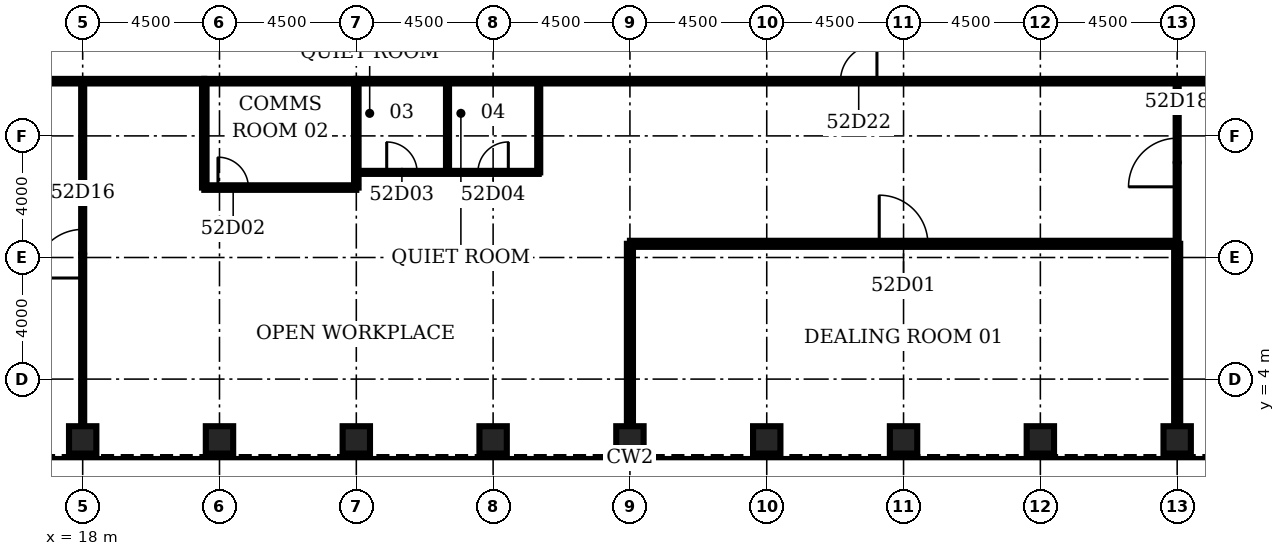
"""IFC4 building model, lengths in metres.
Left out: names, types, materials, properties, quantities, classifications, styles, units other than length and angle.
Written with IfcOpenShell. Run it as: python <this file> out.ifc"""

import sys

from ifc_helpers import new_model, si_unit, direction, frame, frame_2d, origin, origin_2d, place, context, subcontext, project, spatial, rectangle, hollow_rectangle, extrude, element, fill, save


model = new_model("IFC4")
c1 = context("Model", 3, precision=1e-05, world=origin(), true_north=direction((0.0, 1.0)))
c2 = subcontext(c1, "Body", "Model", "MODEL_VIEW")
j1 = project(units=[si_unit("LENGTHUNIT", "METRE"), si_unit("PLANEANGLEUNIT", "RADIAN")], contexts=[c1])
p1 = place(None, origin())
s1 = spatial("IfcSite", under=j1, at=p1, CompositionType="ELEMENT")
p2 = place(p1, origin())
s2 = spatial("IfcBuilding", under=s1, at=p2, CompositionType="ELEMENT")
p3 = place(p2, frame((0.0, 0.0, 232.0)))
s3 = spatial("IfcBuildingStorey", under=s2, at=p3, CompositionType="ELEMENT", Elevation=232.0)
for number, where, z_axis, x_axis in (
    (1, (18.0, 2.0, 0.0), (0.0, 0.0, 1.0), (0.0, 1.0, 0.0)),
    (2, (22.5, 2.0, 0.0), (0.0, 0.0, 1.0), (0.0, 1.0, 0.0)),
    (3, (27.0, 2.0, 0.0), (0.0, 0.0, 1.0), (0.0, 1.0, 0.0)),
    (4, (31.5, 2.0, 0.0), (0.0, 0.0, 1.0), (0.0, 1.0, 0.0)),
    (5, (36.0, 2.0, 0.0), (0.0, 0.0, 1.0), (0.0, 1.0, 0.0)),
    (6, (40.5, 2.0, 0.0), (0.0, 0.0, 1.0), (0.0, 1.0, 0.0)),
    (7, (45.0, 2.0, 0.0), (0.0, 0.0, 1.0), (0.0, 1.0, 0.0)),
    (8, (49.5, 2.0, 0.0), (0.0, 0.0, 1.0), (0.0, 1.0, 0.0)),
    (9, (54.0, 2.0, 0.0), (0.0, 0.0, 1.0), (0.0, 1.0, 0.0)),
):
    element("IfcColumn", number, at=place(p3, frame(where, z_axis=z_axis, x_axis=x_axis)), inside=s3, PredefinedType="COLUMN", context=c2, shape_type="SweptSolid", body=[
        extrude(hollow_rectangle(XDim=0.9, YDim=0.9, WallThickness=0.08, at=origin_2d()), origin(), (0.0, 0.0, 1.0), 4.2),
    ])
p4 = place(p3, frame((36.0, 8.45, 0.0), z_axis=(0.0, 0.0, 1.0), x_axis=(1.0, 0.0, 0.0)))
e10 = element("IfcWall", 10, at=p4, inside=s3, PredefinedType="PARTITIONING", context=c2, shape_type="SweptSolid", body=[
    extrude(rectangle(XDim=18.0, YDim=0.2, at=frame_2d((9.0, 0.0))), origin(), (0.0, 0.0, 1.0), 3.0),
])
p5 = place(p4, frame((8.2, 0.0, 0.0)))
e11 = element("IfcOpeningElement", 11, at=p5, cuts=e10, PredefinedType="OPENING", context=c2, shape_type="SweptSolid", body=[
    extrude(rectangle(XDim=1.6, YDim=2.1, at=frame_2d((0.8, 1.05))), frame((0.0, 0.11, 0.0), z_axis=(0.0, -1.0, 0.0), x_axis=(1.0, 0.0, 0.0)), (0.0, 0.0, 1.0), 0.22),
])
p6 = place(p3, frame((22.0, 10.3, 0.0), z_axis=(0.0, 0.0, 1.0), x_axis=(1.0, 0.0, 0.0)))
e12 = element("IfcWall", 12, at=p6, inside=s3, PredefinedType="PARTITIONING", context=c2, shape_type="SweptSolid", body=[
    extrude(rectangle(XDim=5.0, YDim=0.15, at=frame_2d((2.5, 0.0))), origin(), (0.0, 0.0, 1.0), 3.0),
])
p7 = place(p6, frame((0.45, 0.0, 0.0)))
e13 = element("IfcOpeningElement", 13, at=p7, cuts=e12, PredefinedType="OPENING", context=c2, shape_type="SweptSolid", body=[
    extrude(rectangle(XDim=1.0, YDim=2.1, at=frame_2d((0.5, 1.05))), frame((0.0, 0.085, 0.0), z_axis=(0.0, -1.0, 0.0), x_axis=(1.0, 0.0, 0.0)), (0.0, 0.0, 1.0), 0.17),
])
p8 = place(p3, frame((27.0, 10.8, 0.0), z_axis=(0.0, 0.0, 1.0), x_axis=(1.0, 0.0, 0.0)))
e14 = element("IfcWall", 14, at=p8, inside=s3, PredefinedType="PARTITIONING", context=c2, shape_type="SweptSolid", body=[
    extrude(rectangle(XDim=6.0, YDim=0.1, at=frame_2d((3.0, 0.0))), origin(), (0.0, 0.0, 1.0), 3.0),
])
p9 = place(p8, frame((1.0, 0.0, 0.0)))
e15 = element("IfcOpeningElement", 15, at=p9, cuts=e14, PredefinedType="OPENING", context=c2, shape_type="SweptSolid", body=[
    extrude(rectangle(XDim=1.0, YDim=2.1, at=frame_2d((0.5, 1.05))), frame((0.0, 0.06, 0.0), z_axis=(0.0, -1.0, 0.0), x_axis=(1.0, 0.0, 0.0)), (0.0, 0.0, 1.0), 0.12),
])
p10 = place(p8, frame((4.0, 0.0, 0.0)))
e16 = element("IfcOpeningElement", 16, at=p10, cuts=e14, PredefinedType="OPENING", context=c2, shape_type="SweptSolid", body=[
    extrude(rectangle(XDim=1.0, YDim=2.1, at=frame_2d((0.5, 1.05))), frame((0.0, 0.06, 0.0), z_axis=(0.0, -1.0, 0.0), x_axis=(1.0, 0.0, 0.0)), (0.0, 0.0, 1.0), 0.12),
])
p11 = place(p3, frame((15.2, 13.8, 0.0), z_axis=(0.0, 0.0, 1.0), x_axis=(1.0, 0.0, 0.0)))
e17 = element("IfcWall", 17, at=p11, inside=s3, PredefinedType="PARTITIONING", context=c2, shape_type="SweptSolid", body=[
    extrude(rectangle(XDim=6.8, YDim=0.15, at=frame_2d((3.4, 0.0))), origin(), (0.0, 0.0, 1.0), 3.0),
])
p12 = place(p3, frame((22.0, 13.8, 0.0), z_axis=(0.0, 0.0, 1.0), x_axis=(1.0, 0.0, 0.0)))
e18 = element("IfcWall", 18, at=p12, inside=s3, PredefinedType="PARTITIONING", context=c2, shape_type="SweptSolid", body=[
    extrude(rectangle(XDim=5.0, YDim=0.15, at=frame_2d((2.5, 0.0))), origin(), (0.0, 0.0, 1.0), 3.0),
])
p13 = place(p3, frame((27.0, 13.8, 0.0), z_axis=(0.0, 0.0, 1.0), x_axis=(1.0, 0.0, 0.0)))
e19 = element("IfcWall", 19, at=p13, inside=s3, PredefinedType="PARTITIONING", context=c2, shape_type="SweptSolid", body=[
    extrude(rectangle(XDim=29.8, YDim=0.15, at=frame_2d((14.9, 0.0))), origin(), (0.0, 0.0, 1.0), 3.0),
])
p14 = place(p13, frame((15.925, 0.0, 0.0)))
e20 = element("IfcOpeningElement", 20, at=p14, cuts=e19, PredefinedType="OPENING", context=c2, shape_type="SweptSolid", body=[
    extrude(rectangle(XDim=1.2, YDim=2.1, at=frame_2d((0.6, 1.05))), frame((0.0, 0.085, 0.0), z_axis=(0.0, -1.0, 0.0), x_axis=(1.0, 0.0, 0.0)), (0.0, 0.0, 1.0), 0.17),
])
p15 = place(p3, frame((18.0, 2.45, 0.0), z_axis=(0.0, 0.0, 1.0), x_axis=(0.0, 1.0, 0.0)))
e21 = element("IfcWall", 21, at=p15, inside=s3, PredefinedType="PARTITIONING", context=c2, shape_type="SweptSolid", body=[
    extrude(rectangle(XDim=11.35, YDim=0.1, at=frame_2d((5.675, 0.0))), origin(), (0.0, 0.0, 1.0), 3.0),
])
p16 = place(p15, frame((4.875, 0.0, 0.0)))
e22 = element("IfcOpeningElement", 22, at=p16, cuts=e21, PredefinedType="OPENING", context=c2, shape_type="SweptSolid", body=[
    extrude(rectangle(XDim=1.6, YDim=2.1, at=frame_2d((0.8, 1.05))), frame((0.0, 0.06, 0.0), z_axis=(0.0, -1.0, 0.0), x_axis=(1.0, 0.0, 0.0)), (0.0, 0.0, 1.0), 0.12),
])
for number, where, z_axis, x_axis in (
    (23, (22.0, 10.3, 0.0), (0.0, 0.0, 1.0), (0.0, 1.0, 0.0)),
    (24, (27.0, 10.3, 0.0), (0.0, 0.0, 1.0), (0.0, 1.0, 0.0)),
):
    element("IfcWall", number, at=place(p3, frame(where, z_axis=z_axis, x_axis=x_axis)), inside=s3, PredefinedType="PARTITIONING", context=c2, shape_type="SweptSolid", body=[
        extrude(rectangle(XDim=3.5, YDim=0.15, at=frame_2d((1.75, 0.0))), origin(), (0.0, 0.0, 1.0), 3.0),
    ])
for number, where, z_axis, x_axis in (
    (25, (30.0, 10.8, 0.0), (0.0, 0.0, 1.0), (0.0, 1.0, 0.0)),
    (26, (33.0, 10.8, 0.0), (0.0, 0.0, 1.0), (0.0, 1.0, 0.0)),
):
    element("IfcWall", number, at=place(p3, frame(where, z_axis=z_axis, x_axis=x_axis)), inside=s3, PredefinedType="PARTITIONING", context=c2, shape_type="SweptSolid", body=[
        extrude(rectangle(XDim=3.0, YDim=0.1, at=frame_2d((1.5, 0.0))), origin(), (0.0, 0.0, 1.0), 3.0),
    ])
for number, where, z_axis, x_axis in (
    (27, (36.0, 2.45, 0.0), (0.0, 0.0, 1.0), (0.0, 1.0, 0.0)),
    (28, (54.0, 2.45, 0.0), (0.0, 0.0, 1.0), (0.0, 1.0, 0.0)),
):
    element("IfcWall", number, at=place(p3, frame(where, z_axis=z_axis, x_axis=x_axis)), inside=s3, PredefinedType="PARTITIONING", context=c2, shape_type="SweptSolid", body=[
        extrude(rectangle(XDim=6.0, YDim=0.2, at=frame_2d((3.0, 0.0))), origin(), (0.0, 0.0, 1.0), 3.0),
    ])
p17 = place(p3, frame((54.0, 8.45, 0.0), z_axis=(0.0, 0.0, 1.0), x_axis=(0.0, 1.0, 0.0)))
e29 = element("IfcWall", 29, at=p17, inside=s3, PredefinedType="PARTITIONING", context=c2, shape_type="SweptSolid", body=[
    extrude(rectangle(XDim=5.35, YDim=0.1, at=frame_2d((2.675, 0.0))), origin(), (0.0, 0.0, 1.0), 3.0),
])
p18 = place(p17, frame((1.875, 0.0, 0.0)))
e30 = element("IfcOpeningElement", 30, at=p18, cuts=e29, PredefinedType="OPENING", context=c2, shape_type="SweptSolid", body=[
    extrude(rectangle(XDim=1.6, YDim=2.1, at=frame_2d((0.8, 1.05))), frame((0.0, 0.06, 0.0), z_axis=(0.0, -1.0, 0.0), x_axis=(1.0, 0.0, 0.0)), (0.0, 0.0, 1.0), 0.12),
])
p19 = place(p5, origin())
e31 = element("IfcDoor", 31, at=p19, inside=s3, OperationType="SINGLE_SWING_LEFT", PredefinedType="DOOR", context=c2, shape_type="SweptSolid", body=[
    extrude(rectangle(XDim=1.6, YDim=2.1, at=frame_2d((0.8, 1.05))), frame((0.0, 0.025, 0.0), z_axis=(0.0, -1.0, 0.0), x_axis=(1.0, 0.0, 0.0)), (0.0, 0.0, 1.0), 0.05),
])
fill(e11, e31)
p20 = place(p7, origin())
e32 = element("IfcDoor", 32, at=p20, inside=s3, OperationType="SINGLE_SWING_LEFT", PredefinedType="DOOR", context=c2, shape_type="SweptSolid", body=[
    extrude(rectangle(XDim=1.0, YDim=2.1, at=frame_2d((0.5, 1.05))), frame((0.0, 0.025, 0.0), z_axis=(0.0, -1.0, 0.0), x_axis=(1.0, 0.0, 0.0)), (0.0, 0.0, 1.0), 0.05),
])
fill(e13, e32)
p21 = place(p9, origin())
e33 = element("IfcDoor", 33, at=p21, inside=s3, OperationType="SINGLE_SWING_LEFT", PredefinedType="DOOR", context=c2, shape_type="SweptSolid", body=[
    extrude(rectangle(XDim=1.0, YDim=2.1, at=frame_2d((0.5, 1.05))), frame((0.0, 0.025, 0.0), z_axis=(0.0, -1.0, 0.0), x_axis=(1.0, 0.0, 0.0)), (0.0, 0.0, 1.0), 0.05),
])
fill(e15, e33)
p22 = place(p10, origin())
e34 = element("IfcDoor", 34, at=p22, inside=s3, OperationType="SINGLE_SWING_RIGHT", PredefinedType="DOOR", context=c2, shape_type="SweptSolid", body=[
    extrude(rectangle(XDim=1.0, YDim=2.1, at=frame_2d((0.5, 1.05))), frame((0.0, 0.025, 0.0), z_axis=(0.0, -1.0, 0.0), x_axis=(1.0, 0.0, 0.0)), (0.0, 0.0, 1.0), 0.05),
])
fill(e16, e34)
p23 = place(p16, origin())
e35 = element("IfcDoor", 35, at=p23, inside=s3, OperationType="SINGLE_SWING_LEFT", PredefinedType="DOOR", context=c2, shape_type="SweptSolid", body=[
    extrude(rectangle(XDim=1.6, YDim=2.1, at=frame_2d((0.8, 1.05))), frame((0.0, 0.025, 0.0), z_axis=(0.0, -1.0, 0.0), x_axis=(1.0, 0.0, 0.0)), (0.0, 0.0, 1.0), 0.05),
])
fill(e22, e35)
p24 = place(p18, origin())
e36 = element("IfcDoor", 36, at=p24, inside=s3, OperationType="SINGLE_SWING_LEFT", PredefinedType="DOOR", context=c2, shape_type="SweptSolid", body=[
    extrude(rectangle(XDim=1.6, YDim=2.1, at=frame_2d((0.8, 1.05))), frame((0.0, 0.025, 0.0), z_axis=(0.0, -1.0, 0.0), x_axis=(1.0, 0.0, 0.0)), (0.0, 0.0, 1.0), 0.05),
])
fill(e30, e36)
p25 = place(p14, origin())
e37 = element("IfcDoor", 37, at=p25, inside=s3, OperationType="SINGLE_SWING_RIGHT", PredefinedType="DOOR", context=c2, shape_type="SweptSolid", body=[
    extrude(rectangle(XDim=1.2, YDim=2.1, at=frame_2d((0.6, 1.05))), frame((0.0, 0.025, 0.0), z_axis=(0.0, -1.0, 0.0), x_axis=(1.0, 0.0, 0.0)), (0.0, 0.0, 1.0), 0.05),
])
fill(e20, e37)
save(model, sys.argv[1])
